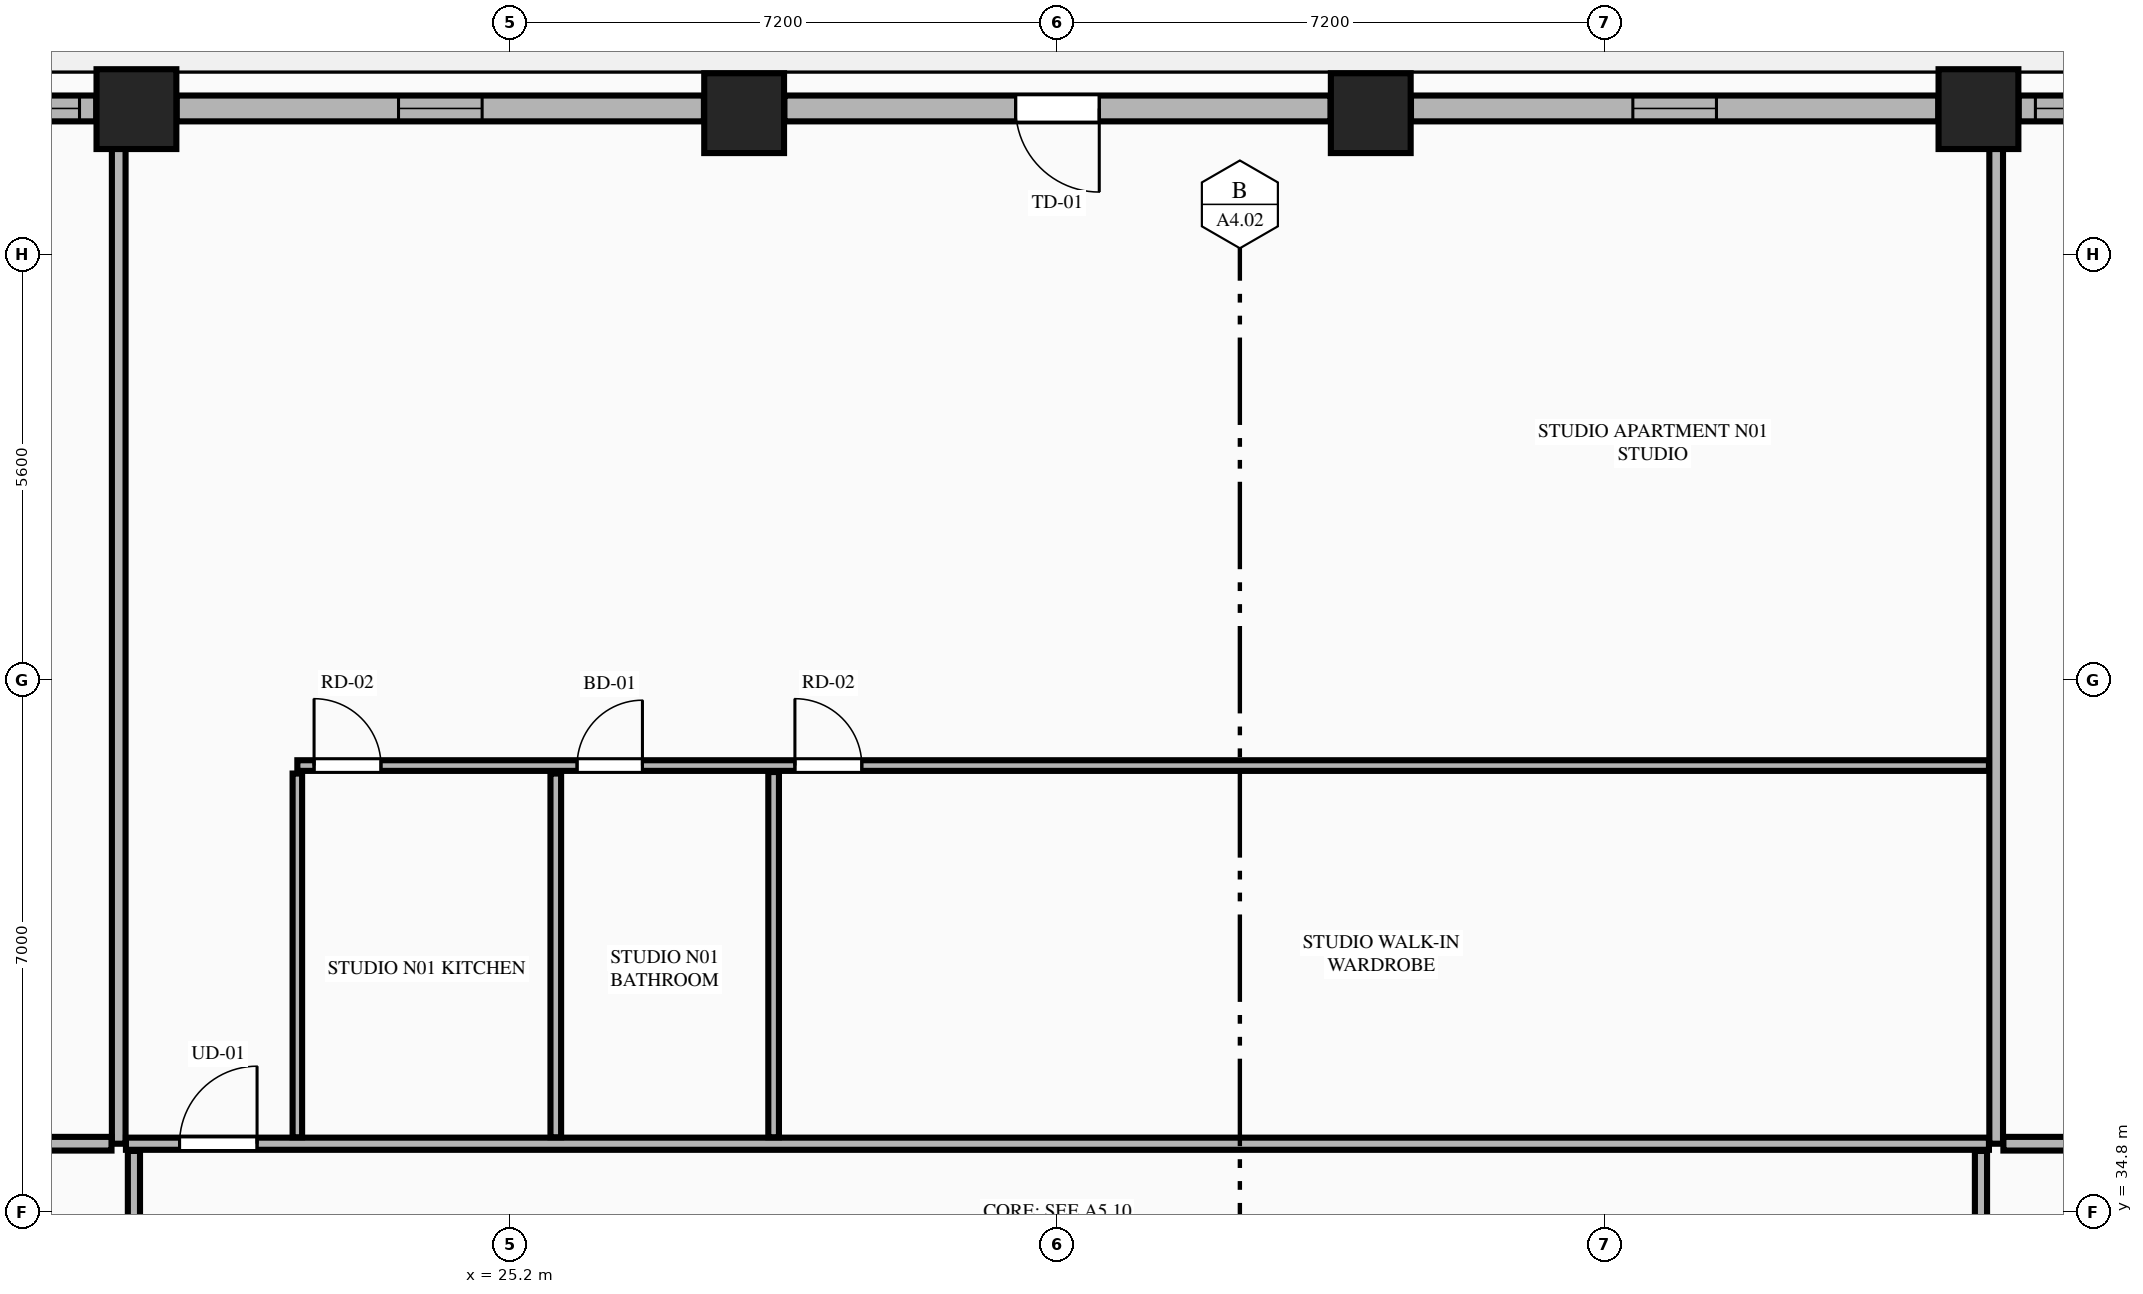
"""IFC4 building model, lengths in metres.
Left out: names, types, materials, properties, quantities, classifications, styles, units other than length and angle.
Written with IfcOpenShell. Run it as: python <this file> out.ifc"""

import sys

from ifc_helpers import new_model, si_unit, direction, frame, frame_2d, origin, origin_2d, place, context, subcontext, project, spatial, rectangle, extrude, element, fill, save


model = new_model("IFC4")
c1 = context("Model", 3, precision=1e-05, world=origin(), true_north=direction((0.0, 1.0)))
c2 = subcontext(c1, "Body", "Model", "MODEL_VIEW")
j1 = project(units=[si_unit("LENGTHUNIT", "METRE"), si_unit("PLANEANGLEUNIT", "RADIAN")], contexts=[c1])
p1 = place(None, origin())
s1 = spatial("IfcSite", under=j1, at=p1, CompositionType="ELEMENT")
p2 = place(p1, origin())
s2 = spatial("IfcBuilding", under=s1, at=p2, CompositionType="ELEMENT")
p3 = place(p2, frame((0.0, 0.0, 90.65)))
s3 = spatial("IfcBuildingStorey", under=s2, at=p3, CompositionType="ELEMENT", Elevation=90.65)
for number, where, z_axis, x_axis in (
    (1, (44.517, 49.311, 0.0), (0.0, 0.0, 1.0), (1.0, 0.0, 0.0)),
    (2, (36.522, 49.258, 0.0), (0.0, 0.0, 1.0), (1.0, 0.0, 0.0)),
    (3, (28.278, 49.258, 0.0), (0.0, 0.0, 1.0), (1.0, 0.0, 0.0)),
    (4, (20.283, 49.311, 0.0), (0.0, 0.0, 1.0), (1.0, 0.0, 0.0)),
):
    element("IfcColumn", number, at=place(p3, frame(where, z_axis=z_axis, x_axis=x_axis)), inside=s3, PredefinedType="COLUMN", context=c2, shape_type="SweptSolid", body=[
        extrude(rectangle(XDim=1.05, YDim=1.05, at=origin_2d()), origin(), (0.0, 0.0, 1.0), 3.55),
    ])
p4 = place(p3, frame((46.366, 49.32, 0.0), z_axis=(0.0, 0.0, 1.0), x_axis=(-1.0, 0.0, 0.0)))
e5 = element("IfcWall", 5, at=p4, inside=s3, PredefinedType="STANDARD", context=c2, shape_type="SweptSolid", body=[
    extrude(rectangle(XDim=1.32, YDim=0.34, at=frame_2d((0.66, 0.0))), origin(), (0.0, 0.0, 1.0), 3.33),
])
p5 = place(p4, frame((0.22, 0.0, 0.75)))
e6 = element("IfcOpeningElement", 6, at=p5, cuts=e5, PredefinedType="OPENING", context=c2, shape_type="SweptSolid", body=[
    extrude(rectangle(XDim=0.88, YDim=2.0, at=frame_2d((0.44, 1.0))), frame((0.0, 0.18, 0.0), z_axis=(0.0, -1.0, 0.0), x_axis=(1.0, 0.0, 0.0)), (0.0, 0.0, 1.0), 0.36),
])
p6 = place(p3, frame((43.988, 49.32, 0.0), z_axis=(0.0, 0.0, 1.0), x_axis=(-1.0, 0.0, 0.0)))
e7 = element("IfcWall", 7, at=p6, inside=s3, PredefinedType="STANDARD", context=c2, shape_type="SweptSolid", body=[
    extrude(rectangle(XDim=6.937, YDim=0.34, at=frame_2d((3.469, 0.0))), origin(), (0.0, 0.0, 1.0), 2.712),
])
p7 = place(p6, frame((2.918, 0.0, 0.75)))
e8 = element("IfcOpeningElement", 8, at=p7, cuts=e7, PredefinedType="OPENING", context=c2, shape_type="SweptSolid", body=[
    extrude(rectangle(XDim=1.1, YDim=1.812, at=frame_2d((0.55, 0.906))), frame((0.0, 0.18, 0.0), z_axis=(0.0, -1.0, 0.0), x_axis=(1.0, 0.0, 0.0)), (0.0, 0.0, 1.0), 0.36),
])
p8 = place(p3, frame((35.993, 49.32, 0.0), z_axis=(0.0, 0.0, 1.0), x_axis=(-1.0, 0.0, 0.0)))
e9 = element("IfcWall", 9, at=p8, inside=s3, PredefinedType="STANDARD", context=c2, shape_type="SweptSolid", body=[
    extrude(rectangle(XDim=7.186, YDim=0.34, at=frame_2d((3.593, 0.0))), origin(), (0.0, 0.0, 1.0), 2.712),
])
p9 = place(p8, frame((3.043, 0.0, 0.0)))
e10 = element("IfcOpeningElement", 10, at=p9, cuts=e9, PredefinedType="OPENING", context=c2, shape_type="SweptSolid", body=[
    extrude(rectangle(XDim=1.1, YDim=2.25, at=frame_2d((0.55, 1.125))), frame((0.0, 0.18, 0.0), z_axis=(0.0, -1.0, 0.0), x_axis=(1.0, 0.0, 0.0)), (0.0, 0.0, 1.0), 0.36),
])
p10 = place(p3, frame((27.749, 49.32, 0.0), z_axis=(0.0, 0.0, 1.0), x_axis=(-1.0, 0.0, 0.0)))
e11 = element("IfcWall", 11, at=p10, inside=s3, PredefinedType="STANDARD", context=c2, shape_type="SweptSolid", body=[
    extrude(rectangle(XDim=6.937, YDim=0.34, at=frame_2d((3.469, 0.0))), origin(), (0.0, 0.0, 1.0), 2.712),
])
p11 = place(p10, frame((2.918, 0.0, 0.75)))
e12 = element("IfcOpeningElement", 12, at=p11, cuts=e11, PredefinedType="OPENING", context=c2, shape_type="SweptSolid", body=[
    extrude(rectangle(XDim=1.1, YDim=1.812, at=frame_2d((0.55, 0.906))), frame((0.0, 0.18, 0.0), z_axis=(0.0, -1.0, 0.0), x_axis=(1.0, 0.0, 0.0)), (0.0, 0.0, 1.0), 0.36),
])
p12 = place(p3, frame((19.754, 49.32, 0.0), z_axis=(0.0, 0.0, 1.0), x_axis=(-1.0, 0.0, 0.0)))
e13 = element("IfcWall", 13, at=p12, inside=s3, PredefinedType="STANDARD", context=c2, shape_type="SweptSolid", body=[
    extrude(rectangle(XDim=1.32, YDim=0.34, at=frame_2d((0.66, 0.0))), origin(), (0.0, 0.0, 1.0), 3.33),
])
p13 = place(p12, frame((0.22, 0.0, 0.75)))
e14 = element("IfcOpeningElement", 14, at=p13, cuts=e13, PredefinedType="OPENING", context=c2, shape_type="SweptSolid", body=[
    extrude(rectangle(XDim=0.88, YDim=2.0, at=frame_2d((0.44, 1.0))), frame((0.0, 0.18, 0.0), z_axis=(0.0, -1.0, 0.0), x_axis=(1.0, 0.0, 0.0)), (0.0, 0.0, 1.0), 0.36),
])
for number, where, z_axis, x_axis in (
    (15, (20.05, 35.7, 0.0), (0.0, 0.0, 1.0), (0.0, 1.0, 0.0)),
    (16, (44.75, 35.7, 0.0), (0.0, 0.0, 1.0), (0.0, 1.0, 0.0)),
):
    element("IfcWall", number, at=place(p3, frame(where, z_axis=z_axis, x_axis=x_axis)), inside=s3, PredefinedType="PARTITIONING", context=c2, shape_type="SweptSolid", body=[
        extrude(rectangle(XDim=13.445, YDim=0.18, at=frame_2d((6.723, 0.0))), origin(), (0.0, 0.0, 1.0), 3.33),
    ])
p14 = place(p3, frame((20.145, 35.7, 0.0), z_axis=(0.0, 0.0, 1.0), x_axis=(1.0, 0.0, 0.0)))
e17 = element("IfcWall", 17, at=p14, inside=s3, PredefinedType="PARTITIONING", context=c2, shape_type="SweptSolid", body=[
    extrude(rectangle(XDim=24.51, YDim=0.16, at=frame_2d((12.255, 0.0))), origin(), (0.0, 0.0, 1.0), 3.33),
])
p15 = place(p14, frame((0.705, 0.0, 0.0)))
e18 = element("IfcOpeningElement", 18, at=p15, cuts=e17, PredefinedType="OPENING", context=c2, shape_type="SweptSolid", body=[
    extrude(rectangle(XDim=1.02, YDim=2.25, at=frame_2d((0.51, 1.125))), frame((0.0, 0.09, 0.0), z_axis=(0.0, -1.0, 0.0), x_axis=(1.0, 0.0, 0.0)), (0.0, 0.0, 1.0), 0.18),
])
p16 = place(p3, frame((22.4, 35.785, 0.0), z_axis=(0.0, 0.0, 1.0), x_axis=(0.0, 1.0, 0.0)))
e19 = element("IfcWall", 19, at=p16, inside=s3, PredefinedType="PARTITIONING", context=c2, shape_type="SweptSolid", body=[
    extrude(rectangle(XDim=4.785, YDim=0.125, at=frame_2d((2.393, 0.0))), origin(), (0.0, 0.0, 1.0), 2.637),
])
p17 = place(p3, frame((22.4, 40.675, 0.0), z_axis=(0.0, 0.0, 1.0), x_axis=(1.0, 0.0, 0.0)))
e20 = element("IfcWall", 20, at=p17, inside=s3, PredefinedType="PLUMBINGWALL", context=c2, shape_type="SweptSolid", body=[
    extrude(rectangle(XDim=22.255, YDim=0.14, at=frame_2d((11.127, 0.0))), origin(), (0.0, 0.0, 1.0), 3.33),
])
p18 = place(p17, frame((3.68, 0.0, 0.0)))
e21 = element("IfcOpeningElement", 21, at=p18, cuts=e20, PredefinedType="OPENING", context=c2, shape_type="SweptSolid", body=[
    extrude(rectangle(XDim=0.86, YDim=2.1, at=frame_2d((0.43, 1.05))), frame((0.0, 0.08, 0.0), z_axis=(0.0, -1.0, 0.0), x_axis=(1.0, 0.0, 0.0)), (0.0, 0.0, 1.0), 0.16),
])
p19 = place(p17, frame((6.546, 0.0, 0.0)))
e22 = element("IfcOpeningElement", 22, at=p19, cuts=e20, PredefinedType="OPENING", context=c2, shape_type="SweptSolid", body=[
    extrude(rectangle(XDim=0.88, YDim=2.15, at=frame_2d((0.44, 1.075))), frame((0.0, 0.08, 0.0), z_axis=(0.0, -1.0, 0.0), x_axis=(1.0, 0.0, 0.0)), (0.0, 0.0, 1.0), 0.16),
])
p20 = place(p17, frame((0.22, 0.0, 0.0)))
e23 = element("IfcOpeningElement", 23, at=p20, cuts=e20, PredefinedType="OPENING", context=c2, shape_type="SweptSolid", body=[
    extrude(rectangle(XDim=0.88, YDim=2.15, at=frame_2d((0.44, 1.075))), frame((0.0, 0.08, 0.0), z_axis=(0.0, -1.0, 0.0), x_axis=(1.0, 0.0, 0.0)), (0.0, 0.0, 1.0), 0.16),
])
p21 = place(p3, frame((25.8, 35.785, 0.0), z_axis=(0.0, 0.0, 1.0), x_axis=(0.0, 1.0, 0.0)))
e24 = element("IfcWall", 24, at=p21, inside=s3, PredefinedType="PLUMBINGWALL", context=c2, shape_type="SweptSolid", body=[
    extrude(rectangle(XDim=4.785, YDim=0.14, at=frame_2d((2.393, 0.0))), origin(), (0.0, 0.0, 1.0), 3.33),
])
p22 = place(p3, frame((28.666, 35.785, 0.0), z_axis=(0.0, 0.0, 1.0), x_axis=(0.0, 1.0, 0.0)))
e25 = element("IfcWall", 25, at=p22, inside=s3, PredefinedType="PLUMBINGWALL", context=c2, shape_type="SweptSolid", body=[
    extrude(rectangle(XDim=4.805, YDim=0.14, at=frame_2d((2.403, 0.0))), origin(), (0.0, 0.0, 1.0), 3.33),
])
for number, where, z_axis, x_axis in (
    (26, (10.589, 35.7, 0.0), (0.0, 0.0, 1.0), (1.0, 0.0, 0.0)),
    (27, (44.845, 35.7, 0.0), (0.0, 0.0, 1.0), (1.0, 0.0, 0.0)),
):
    element("IfcWall", number, at=place(p3, frame(where, z_axis=z_axis, x_axis=x_axis)), inside=s3, PredefinedType="PARTITIONING", context=c2, shape_type="SweptSolid", body=[
        extrude(rectangle(XDim=9.366, YDim=0.18, at=frame_2d((4.683, 0.0))), origin(), (0.0, 0.0, 1.0), 3.33),
    ])
p23 = place(p3, frame((20.25, 25.603, 0.0), z_axis=(0.0, 0.0, 1.0), x_axis=(0.0, 1.0, 0.0)))
e28 = element("IfcWall", 28, at=p23, inside=s3, PredefinedType="PARTITIONING", context=c2, shape_type="SweptSolid", body=[
    extrude(rectangle(XDim=10.002, YDim=0.16, at=frame_2d((5.001, 0.0))), origin(), (0.0, 0.0, 1.0), 2.637),
])
p24 = place(p23, frame((0.45, 0.0, 0.0)))
e29 = element("IfcOpeningElement", 29, at=p24, cuts=e28, PredefinedType="OPENING", context=c2, shape_type="SweptSolid", body=[
    extrude(rectangle(XDim=1.02, YDim=2.25, at=frame_2d((0.51, 1.125))), frame((0.0, 0.09, 0.0), z_axis=(0.0, -1.0, 0.0), x_axis=(1.0, 0.0, 0.0)), (0.0, 0.0, 1.0), 0.18),
])
p25 = place(p3, frame((44.55, 16.195, 0.0), z_axis=(0.0, 0.0, 1.0), x_axis=(0.0, 1.0, 0.0)))
e30 = element("IfcWall", 30, at=p25, inside=s3, PredefinedType="PARTITIONING", context=c2, shape_type="SweptSolid", body=[
    extrude(rectangle(XDim=19.41, YDim=0.16, at=frame_2d((9.705, 0.0))), origin(), (0.0, 0.0, 1.0), 2.637),
])
p26 = place(p25, frame((0.4, 0.0, 0.0)))
e31 = element("IfcOpeningElement", 31, at=p26, cuts=e30, PredefinedType="OPENING", context=c2, shape_type="SweptSolid", body=[
    extrude(rectangle(XDim=1.02, YDim=2.25, at=frame_2d((0.51, 1.125))), frame((0.0, 0.09, 0.0), z_axis=(0.0, -1.0, 0.0), x_axis=(1.0, 0.0, 0.0)), (0.0, 0.0, 1.0), 0.18),
])
p27 = place(p7, origin())
e32 = element("IfcWindow", 32, at=p27, inside=s3, PartitioningType="SINGLE_PANEL", PredefinedType="WINDOW", context=c2, shape_type="SweptSolid", body=[
    extrude(rectangle(XDim=1.1, YDim=1.812, at=frame_2d((0.55, 0.906))), frame((0.0, 0.03, 0.0), z_axis=(0.0, -1.0, 0.0), x_axis=(1.0, 0.0, 0.0)), (0.0, 0.0, 1.0), 0.06),
])
fill(e8, e32)
p28 = place(p9, origin())
e33 = element("IfcDoor", 33, at=p28, inside=s3, OperationType="SINGLE_SWING_LEFT", PredefinedType="DOOR", context=c2, shape_type="SweptSolid", body=[
    extrude(rectangle(XDim=1.1, YDim=2.25, at=frame_2d((0.55, 1.125))), frame((0.0, 0.025, 0.0), z_axis=(0.0, -1.0, 0.0), x_axis=(1.0, 0.0, 0.0)), (0.0, 0.0, 1.0), 0.05),
])
fill(e10, e33)
p29 = place(p11, origin())
e34 = element("IfcWindow", 34, at=p29, inside=s3, PartitioningType="SINGLE_PANEL", PredefinedType="WINDOW", context=c2, shape_type="SweptSolid", body=[
    extrude(rectangle(XDim=1.1, YDim=1.812, at=frame_2d((0.55, 0.906))), frame((0.0, 0.03, 0.0), z_axis=(0.0, -1.0, 0.0), x_axis=(1.0, 0.0, 0.0)), (0.0, 0.0, 1.0), 0.06),
])
fill(e12, e34)
p30 = place(p18, origin())
e35 = element("IfcDoor", 35, at=p30, inside=s3, OperationType="SINGLE_SWING_RIGHT", PredefinedType="DOOR", context=c2, shape_type="SweptSolid", body=[
    extrude(rectangle(XDim=0.86, YDim=2.1, at=frame_2d((0.43, 1.05))), frame((0.0, 0.025, 0.0), z_axis=(0.0, -1.0, 0.0), x_axis=(1.0, 0.0, 0.0)), (0.0, 0.0, 1.0), 0.05),
])
fill(e21, e35)
p31 = place(p19, origin())
e36 = element("IfcDoor", 36, at=p31, inside=s3, OperationType="SINGLE_SWING_LEFT", PredefinedType="DOOR", context=c2, shape_type="SweptSolid", body=[
    extrude(rectangle(XDim=0.88, YDim=2.15, at=frame_2d((0.44, 1.075))), frame((0.0, 0.025, 0.0), z_axis=(0.0, -1.0, 0.0), x_axis=(1.0, 0.0, 0.0)), (0.0, 0.0, 1.0), 0.05),
])
fill(e22, e36)
p32 = place(p15, origin())
e37 = element("IfcDoor", 37, at=p32, inside=s3, OperationType="SINGLE_SWING_RIGHT", PredefinedType="DOOR", context=c2, shape_type="SweptSolid", body=[
    extrude(rectangle(XDim=1.02, YDim=2.25, at=frame_2d((0.51, 1.125))), frame((0.0, 0.025, 0.0), z_axis=(0.0, -1.0, 0.0), x_axis=(1.0, 0.0, 0.0)), (0.0, 0.0, 1.0), 0.05),
])
fill(e18, e37)
p33 = place(p20, origin())
e38 = element("IfcDoor", 38, at=p33, inside=s3, OperationType="SINGLE_SWING_LEFT", PredefinedType="DOOR", context=c2, shape_type="SweptSolid", body=[
    extrude(rectangle(XDim=0.88, YDim=2.15, at=frame_2d((0.44, 1.075))), frame((0.0, 0.025, 0.0), z_axis=(0.0, -1.0, 0.0), x_axis=(1.0, 0.0, 0.0)), (0.0, 0.0, 1.0), 0.05),
])
fill(e23, e38)
p34 = place(p5, origin())
e39 = element("IfcWindow", 39, at=p34, inside=s3, PartitioningType="SINGLE_PANEL", PredefinedType="WINDOW", context=c2, shape_type="SweptSolid", body=[
    extrude(rectangle(XDim=0.88, YDim=2.0, at=frame_2d((0.44, 1.0))), frame((0.0, 0.03, 0.0), z_axis=(0.0, -1.0, 0.0), x_axis=(1.0, 0.0, 0.0)), (0.0, 0.0, 1.0), 0.06),
])
fill(e6, e39)
p35 = place(p13, origin())
e40 = element("IfcWindow", 40, at=p35, inside=s3, PartitioningType="SINGLE_PANEL", PredefinedType="WINDOW", context=c2, shape_type="SweptSolid", body=[
    extrude(rectangle(XDim=0.88, YDim=2.0, at=frame_2d((0.44, 1.0))), frame((0.0, 0.03, 0.0), z_axis=(0.0, -1.0, 0.0), x_axis=(1.0, 0.0, 0.0)), (0.0, 0.0, 1.0), 0.06),
])
fill(e14, e40)
save(model, sys.argv[1])
